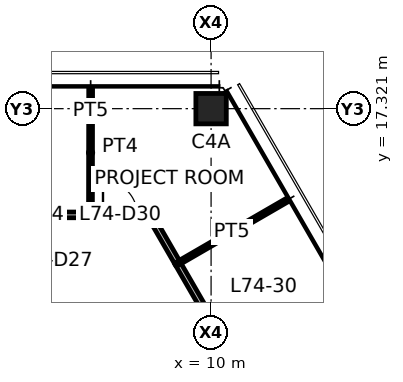
"""IFC4 building model, lengths in metres.
Left out: names, types, materials, properties, quantities, classifications, styles, units other than length and angle.
Written with IfcOpenShell. Run it as: python <this file> out.ifc"""

import sys

from ifc_helpers import new_model, si_unit, direction, frame, frame_2d, origin, origin_2d, place, context, subcontext, project, spatial, rectangle, hollow_rectangle, extrude, element, fill, save


model = new_model("IFC4")
c1 = context("Model", 3, precision=1e-05, world=origin(), true_north=direction((0.0, 1.0)))
c2 = subcontext(c1, "Body", "Model", "MODEL_VIEW")
j1 = project(units=[si_unit("LENGTHUNIT", "METRE"), si_unit("PLANEANGLEUNIT", "RADIAN")], contexts=[c1])
p1 = place(None, origin())
s1 = spatial("IfcSite", under=j1, at=p1, CompositionType="ELEMENT")
p2 = place(p1, origin())
s2 = spatial("IfcBuilding", under=s1, at=p2, CompositionType="ELEMENT")
p3 = place(p2, frame((0.0, 0.0, 294.7)))
s3 = spatial("IfcBuildingStorey", under=s2, at=p3, CompositionType="ELEMENT", Elevation=294.7)
p4 = place(p3, frame((10.0, 17.321, 0.0), z_axis=(0.0, 0.0, 1.0), x_axis=(1.0, 0.0, 0.0)))
e1 = element("IfcColumn", 1, at=p4, inside=s3, PredefinedType="COLUMN", context=c2, shape_type="SweptSolid", body=[
    extrude(hollow_rectangle(XDim=0.8, YDim=0.8, WallThickness=0.04, at=origin_2d()), origin(), (0.0, 0.0, 1.0), 3.9),
])
p5 = place(p3, frame((9.119, 13.256, 0.0), z_axis=(0.0, 0.0, 1.0), x_axis=(0.499990242038, -0.866031037473, 0.0)))
e2 = element("IfcWall", 2, at=p5, inside=s3, PredefinedType="PARTITIONING", context=c2, shape_type="SweptSolid", body=[
    extrude(rectangle(XDim=3.341, YDim=0.15, at=frame_2d((1.67, 0.0))), origin(), (0.0, 0.0, 1.0), 2.95),
])
p6 = place(p3, frame((4.46, 14.525, 0.0), z_axis=(0.0, 0.0, 1.0), x_axis=(1.0, 0.0, 0.0)))
e3 = element("IfcWall", 3, at=p6, inside=s3, PredefinedType="PARTITIONING", context=c2, shape_type="SweptSolid", body=[
    extrude(rectangle(XDim=2.376, YDim=0.15, at=frame_2d((1.188, 0.0))), origin(), (0.0, 0.0, 1.0), 2.95),
])
p7 = place(p6, frame((0.3, 0.0, 0.0)))
e4 = element("IfcOpeningElement", 4, at=p7, cuts=e3, PredefinedType="OPENING", context=c2, shape_type="SweptSolid", body=[
    extrude(rectangle(XDim=0.9, YDim=2.1, at=frame_2d((0.45, 1.05))), frame((0.0, 0.085, 0.0), z_axis=(0.0, -1.0, 0.0), x_axis=(1.0, 0.0, 0.0)), (0.0, 0.0, 1.0), 0.17),
])
p8 = place(p3, frame((6.826, 14.525, 0.0), z_axis=(0.0, 0.0, 1.0), x_axis=(1.0, 0.0, 0.0)))
e5 = element("IfcWall", 5, at=p8, inside=s3, PredefinedType="PARTITIONING", context=c2, shape_type="SweptSolid", body=[
    extrude(rectangle(XDim=1.56, YDim=0.15, at=frame_2d((0.78, 0.0))), origin(), (0.0, 0.0, 1.0), 2.95),
])
p9 = place(p8, frame((0.33, 0.0, 0.0)))
e6 = element("IfcOpeningElement", 6, at=p9, cuts=e5, PredefinedType="OPENING", context=c2, shape_type="SweptSolid", body=[
    extrude(rectangle(XDim=0.9, YDim=2.1, at=frame_2d((0.45, 1.05))), frame((0.0, 0.085, 0.0), z_axis=(0.0, -1.0, 0.0), x_axis=(1.0, 0.0, 0.0)), (0.0, 0.0, 1.0), 0.17),
])
p10 = place(p3, frame((8.386, 14.525, 0.0), z_axis=(0.0, 0.0, 1.0), x_axis=(0.500090108003, -0.865973373654, 0.0)))
e7 = element("IfcWall", 7, at=p10, inside=s3, PredefinedType="PARTITIONING", context=c2, shape_type="SweptSolid", body=[
    extrude(rectangle(XDim=1.475, YDim=0.15, at=frame_2d((0.738, 0.0))), origin(), (0.0, 0.0, 1.0), 2.95),
])
p11 = place(p3, frame((9.124, 13.247, 0.0), z_axis=(0.0, 0.0, 1.0), x_axis=(0.865292288087, 0.501267649243, 0.0)))
e8 = element("IfcWall", 8, at=p11, inside=s3, PredefinedType="PARTITIONING", context=c2, shape_type="SweptSolid", body=[
    extrude(rectangle(XDim=3.286, YDim=0.1, at=frame_2d((1.643, 0.0))), origin(), (0.0, 0.0, 1.0), 2.95),
])
p12 = place(p3, frame((6.831, 17.801, 0.0), z_axis=(0.0, 0.0, 1.0), x_axis=(-0.001490644539, -0.999998888989, 0.0)))
e9 = element("IfcWall", 9, at=p12, inside=s3, PredefinedType="PARTITIONING", context=c2, shape_type="SweptSolid", body=[
    extrude(rectangle(XDim=3.276, YDim=0.1, at=frame_2d((1.638, 0.0))), origin(), (0.0, 0.0, 1.0), 2.95),
])
p13 = place(p9, origin())
e10 = element("IfcDoor", 10, at=p13, inside=s3, OperationType="SINGLE_SWING_LEFT", PredefinedType="DOOR", context=c2, shape_type="SweptSolid", body=[
    extrude(rectangle(XDim=0.9, YDim=2.1, at=frame_2d((0.45, 1.05))), frame((0.0, 0.025, 0.0), z_axis=(0.0, -1.0, 0.0), x_axis=(1.0, 0.0, 0.0)), (0.0, 0.0, 1.0), 0.05),
])
fill(e6, e10)
save(model, sys.argv[1])
